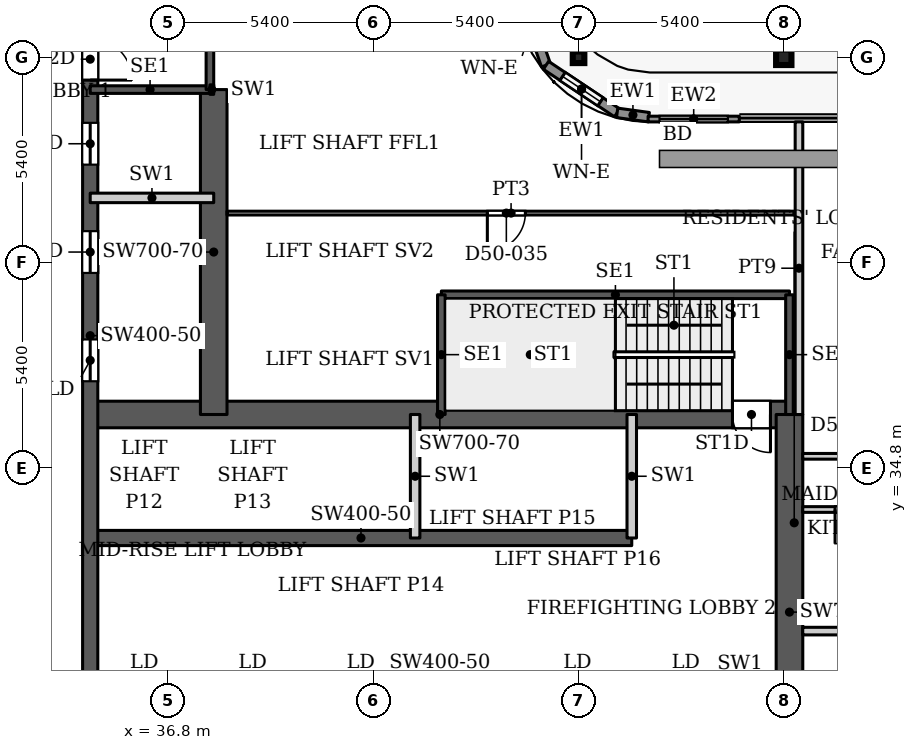
"""IFC4 building model, lengths in metres.
Left out: names, types, materials, properties, quantities, classifications, styles, units other than length and angle.
Written with IfcOpenShell. Run it as: python <this file> out.ifc"""

import sys

from ifc_helpers import new_model, si_unit, direction, frame, frame_2d, origin, origin_2d, place, context, subcontext, project, spatial, rectangle, hollow_rectangle, i_section, extrude, source, transform, mapped, element, fill, save


model = new_model("IFC4")
c1 = context("Model", 3, precision=1e-05, world=origin(), true_north=direction((0.0, 1.0)))
c2 = subcontext(c1, "Body", "Model", "MODEL_VIEW")
j1 = project(units=[si_unit("LENGTHUNIT", "METRE"), si_unit("PLANEANGLEUNIT", "RADIAN")], contexts=[c1])
p1 = place(None, origin())
s1 = spatial("IfcSite", under=j1, at=p1, CompositionType="ELEMENT")
p2 = place(p1, origin())
s2 = spatial("IfcBuilding", under=s1, at=p2, CompositionType="ELEMENT")
p3 = place(p2, frame((0.0, 0.0, 220.1)))
s3 = spatial("IfcBuildingStorey", under=s2, at=p3, CompositionType="ELEMENT", Elevation=220.1)
p4 = place(p3, frame((53.0, 45.6, 0.0), z_axis=(0.0, 0.0, 1.0), x_axis=(1.0, 0.0, 0.0)))
e1 = element("IfcColumn", 1, at=p4, inside=s3, PredefinedType="COLUMN", context=c2, shape_type="SweptSolid", body=[
    extrude(i_section(OverallWidth=0.404, OverallDepth=0.407, WebThickness=0.027, FlangeThickness=0.044, FilletRadius=0.012, at=origin_2d()), origin(), (0.0, 0.0, 1.0), 3.9),
])
p5 = place(p3, frame((47.6, 45.6, 0.0), z_axis=(0.0, 0.0, 1.0), x_axis=(1.0, 0.0, 0.0)))
e2 = element("IfcColumn", 2, at=p5, inside=s3, PredefinedType="COLUMN", context=c2, shape_type="SweptSolid", body=[
    extrude(hollow_rectangle(XDim=0.305, YDim=0.305, WallThickness=0.016, InnerFilletRadius=0.016, OuterFilletRadius=0.032, at=origin_2d()), origin(), (0.0, 0.0, 1.0), 3.9),
])
p6 = place(p3, frame((34.75, 32.95, 0.0), z_axis=(0.0, 0.0, 1.0), x_axis=(1.0, 0.0, 0.0)))
e3 = element("IfcWall", 3, at=p6, inside=s3, PredefinedType="SHEAR", context=c2, shape_type="SweptSolid", body=[
    extrude(rectangle(XDim=14.25, YDim=0.4, at=frame_2d((7.125, 0.0))), origin(), (0.0, 0.0, 1.0), 3.9),
])
p7 = place(p3, frame((34.75, 36.2, 0.0), z_axis=(0.0, 0.0, 1.0), x_axis=(1.0, 0.0, 0.0)))
e4 = element("IfcWall", 4, at=p7, inside=s3, PredefinedType="SHEAR", context=c2, shape_type="SweptSolid", body=[
    extrude(rectangle(XDim=18.4, YDim=0.7, at=frame_2d((9.2, 0.0))), origin(), (0.0, 0.0, 1.0), 3.9),
])
p8 = place(p7, frame((16.9, 0.0, 0.0)))
e5 = element("IfcOpeningElement", 5, at=p8, cuts=e4, PredefinedType="OPENING", context=c2, shape_type="SweptSolid", body=[
    extrude(rectangle(XDim=1.0, YDim=2.2, at=frame_2d((0.5, 1.1))), frame((0.0, 0.36, 0.0), z_axis=(0.0, -1.0, 0.0), x_axis=(1.0, 0.0, 0.0)), (0.0, 0.0, 1.0), 0.72),
])
p9 = place(p3, frame((34.75, 29.05, 0.0), z_axis=(0.0, 0.0, 1.0), x_axis=(0.0, 1.0, 0.0)))
e6 = element("IfcWall", 6, at=p9, inside=s3, PredefinedType="SHEAR", context=c2, shape_type="SweptSolid", body=[
    extrude(rectangle(XDim=18.45, YDim=0.4, at=frame_2d((9.225, 0.0))), origin(), (0.0, 0.0, 1.0), 3.9),
])
p10 = place(p9, frame((8.025, 0.0, 0.0)))
e7 = element("IfcOpeningElement", 7, at=p10, cuts=e6, PredefinedType="OPENING", context=c2, shape_type="SweptSolid", body=[
    extrude(rectangle(XDim=1.1, YDim=2.2, at=frame_2d((0.55, 1.1))), frame((0.0, 0.21, 0.0), z_axis=(0.0, -1.0, 0.0), x_axis=(1.0, 0.0, 0.0)), (0.0, 0.0, 1.0), 0.42),
])
p11 = place(p9, frame((10.875, 0.0, 0.0)))
e8 = element("IfcOpeningElement", 8, at=p11, cuts=e6, PredefinedType="OPENING", context=c2, shape_type="SweptSolid", body=[
    extrude(rectangle(XDim=1.1, YDim=2.2, at=frame_2d((0.55, 1.1))), frame((0.0, 0.21, 0.0), z_axis=(0.0, -1.0, 0.0), x_axis=(1.0, 0.0, 0.0)), (0.0, 0.0, 1.0), 0.42),
])
p12 = place(p9, frame((13.725, 0.0, 0.0)))
e9 = element("IfcOpeningElement", 9, at=p12, cuts=e6, PredefinedType="OPENING", context=c2, shape_type="SweptSolid", body=[
    extrude(rectangle(XDim=1.1, YDim=2.2, at=frame_2d((0.55, 1.1))), frame((0.0, 0.21, 0.0), z_axis=(0.0, -1.0, 0.0), x_axis=(1.0, 0.0, 0.0)), (0.0, 0.0, 1.0), 0.42),
])
p13 = place(p9, frame((15.95, 0.0, 0.0)))
e10 = element("IfcOpeningElement", 10, at=p13, cuts=e6, PredefinedType="OPENING", context=c2, shape_type="SweptSolid", body=[
    extrude(rectangle(XDim=1.1, YDim=2.2, at=frame_2d((0.55, 1.1))), frame((0.0, 0.21, 0.0), z_axis=(0.0, -1.0, 0.0), x_axis=(1.0, 0.0, 0.0)), (0.0, 0.0, 1.0), 0.42),
])
p14 = place(p3, frame((38.0, 36.2, 0.0), z_axis=(0.0, 0.0, 1.0), x_axis=(0.0, 1.0, 0.0)))
e11 = element("IfcWall", 11, at=p14, inside=s3, PredefinedType="SHEAR", context=c2, shape_type="SweptSolid", body=[
    extrude(rectangle(XDim=8.55, YDim=0.7, at=frame_2d((4.275, 0.0))), origin(), (0.0, 0.0, 1.0), 3.9),
])
p15 = place(p3, frame((53.15, 25.8, 0.0), z_axis=(0.0, 0.0, 1.0), x_axis=(0.0, 1.0, 0.0)))
e12 = element("IfcWall", 12, at=p15, inside=s3, PredefinedType="SHEAR", context=c2, shape_type="SweptSolid", body=[
    extrude(rectangle(XDim=10.4, YDim=0.7, at=frame_2d((5.2, 0.0))), origin(), (0.0, 0.0, 1.0), 3.9),
])
p16 = place(p3, frame((46.018, 47.471, 0.0), z_axis=(0.0, 0.0, 1.0), x_axis=(0.328791208903, -0.944402637093, 0.0)))
e13 = element("IfcWall", 13, at=p16, inside=s3, PredefinedType="SOLIDWALL", context=c2, shape_type="SweptSolid", body=[
    extrude(rectangle(XDim=2.205, YDim=0.25, at=frame_2d((1.102, 0.0))), origin(), (0.0, 0.0, 1.0), 3.75),
])
p17 = place(p16, frame((0.503, 0.0, 0.6)))
e14 = element("IfcOpeningElement", 14, at=p17, cuts=e13, PredefinedType="OPENING", context=c2, shape_type="SweptSolid", body=[
    extrude(rectangle(XDim=1.2, YDim=2.1, at=frame_2d((0.6, 1.05))), frame((0.0, 0.135, 0.0), z_axis=(0.0, -1.0, 0.0), x_axis=(1.0, 0.0, 0.0)), (0.0, 0.0, 1.0), 0.27),
])
p18 = place(p3, frame((46.743, 45.389, 0.0), z_axis=(0.0, 0.0, 1.0), x_axis=(0.831449265529, -0.555600682912, 0.0)))
e15 = element("IfcWall", 15, at=p18, inside=s3, PredefinedType="SOLIDWALL", context=c2, shape_type="SweptSolid", body=[
    extrude(rectangle(XDim=2.251, YDim=0.25, at=frame_2d((1.126, 0.0))), origin(), (0.0, 0.0, 1.0), 3.75),
])
p19 = place(p18, frame((0.525, 0.0, 0.6)))
e16 = element("IfcOpeningElement", 16, at=p19, cuts=e15, PredefinedType="OPENING", context=c2, shape_type="SweptSolid", body=[
    extrude(rectangle(XDim=1.2, YDim=2.1, at=frame_2d((0.6, 1.05))), frame((0.0, 0.135, 0.0), z_axis=(0.0, -1.0, 0.0), x_axis=(1.0, 0.0, 0.0)), (0.0, 0.0, 1.0), 0.27),
])
p20 = place(p3, frame((48.615, 44.138, 0.0), z_axis=(0.0, 0.0, 1.0), x_axis=(0.990741504246, -0.135761819977, 0.0)))
e17 = element("IfcWall", 17, at=p20, inside=s3, PredefinedType="SOLIDWALL", context=c2, shape_type="SweptSolid", body=[
    extrude(rectangle(XDim=0.84, YDim=0.25, at=frame_2d((0.42, 0.0))), origin(), (0.0, 0.0, 1.0), 3.75),
])
p21 = place(p3, frame((49.43, 43.975, 0.0), z_axis=(0.0, 0.0, 1.0), x_axis=(1.0, 0.0, 0.0)))
e18 = element("IfcWall", 18, at=p21, inside=s3, PredefinedType="SOLIDWALL", context=c2, shape_type="SweptSolid", body=[
    extrude(rectangle(XDim=2.4, YDim=0.15, at=frame_2d((1.2, 0.0))), origin(), (0.0, 0.0, 1.0), 3.75),
])
p22 = place(p21, frame((0.3, 0.0, 0.0)))
e19 = element("IfcOpeningElement", 19, at=p22, cuts=e18, PredefinedType="OPENING", context=c2, shape_type="SweptSolid", body=[
    extrude(rectangle(XDim=1.8, YDim=2.4, at=frame_2d((0.9, 1.2))), frame((0.0, 0.085, 0.0), z_axis=(0.0, -1.0, 0.0), x_axis=(1.0, 0.0, 0.0)), (0.0, 0.0, 1.0), 0.17),
])
p23 = place(p3, frame((43.99, 39.35, 0.0), z_axis=(0.0, 0.0, 1.0), x_axis=(1.0, 0.0, 0.0)))
e20 = element("IfcWall", 20, at=p23, inside=s3, PredefinedType="SHEAR", context=c2, shape_type="SweptSolid", body=[
    extrude(rectangle(XDim=9.16, YDim=0.2, at=frame_2d((4.58, 0.0))), origin(), (0.0, 0.0, 1.0), 3.9),
])
for number, where, z_axis, x_axis in (
    (21, (43.99, 36.2, 0.0), (0.0, 0.0, 1.0), (0.0, 1.0, 0.0)),
    (22, (53.15, 36.2, 0.0), (0.0, 0.0, 1.0), (0.0, 1.0, 0.0)),
):
    element("IfcWall", number, at=place(p3, frame(where, z_axis=z_axis, x_axis=x_axis)), inside=s3, PredefinedType="SHEAR", context=c2, shape_type="SweptSolid", body=[
        extrude(rectangle(XDim=3.15, YDim=0.2, at=frame_2d((1.575, 0.0))), origin(), (0.0, 0.0, 1.0), 3.9),
    ])
p24 = place(p3, frame((34.75, 44.75, 0.0), z_axis=(0.0, 0.0, 1.0), x_axis=(1.0, 0.0, 0.0)))
e23 = element("IfcWall", 23, at=p24, inside=s3, PredefinedType="SHEAR", context=c2, shape_type="SweptSolid", body=[
    extrude(rectangle(XDim=3.15, YDim=0.2, at=frame_2d((1.575, 0.0))), origin(), (0.0, 0.0, 1.0), 3.9),
])
p25 = place(p3, frame((37.9, 44.75, 0.0), z_axis=(0.0, 0.0, 1.0), x_axis=(0.0, 1.0, 0.0)))
e24 = element("IfcWall", 24, at=p25, inside=s3, PredefinedType="SHEAR", context=c2, shape_type="SweptSolid", body=[
    extrude(rectangle(XDim=9.16, YDim=0.2, at=frame_2d((4.58, 0.0))), origin(), (0.0, 0.0, 1.0), 3.9),
])
for number, where, z_axis, x_axis in (
    (25, (43.3, 32.95, 0.0), (0.0, 0.0, 1.0), (0.0, 1.0, 0.0)),
    (26, (49.0, 32.95, 0.0), (0.0, 0.0, 1.0), (0.0, 1.0, 0.0)),
    (27, (34.75, 41.9, 0.0), (0.0, 0.0, 1.0), (1.0, 0.0, 0.0)),
):
    element("IfcWall", number, at=place(p3, frame(where, z_axis=z_axis, x_axis=x_axis)), inside=s3, PredefinedType="PARTITIONING", context=c2, shape_type="SweptSolid", body=[
        extrude(rectangle(XDim=3.25, YDim=0.25, at=frame_2d((1.625, 0.0))), origin(), (0.0, 0.0, 1.0), 3.9),
    ])
p26 = place(p3, frame((37.9, 44.75, 0.0), z_axis=(0.0, 0.0, 1.0), x_axis=(1.0, 0.0, 0.0)))
e28 = element("IfcWall", 28, at=p26, inside=s3, PredefinedType="PARTITIONING", context=c2, shape_type="SweptSolid", body=[
    extrude(rectangle(XDim=0.1, YDim=0.25, at=frame_2d((0.05, 0.0))), origin(), (0.0, 0.0, 1.0), 3.9),
])
p27 = place(p3, frame((38.349, 41.5, 0.0), z_axis=(0.0, 0.0, 1.0), x_axis=(1.0, 0.0, 0.0)))
e29 = element("IfcWall", 29, at=p27, inside=s3, PredefinedType="PARTITIONING", context=c2, shape_type="SweptSolid", body=[
    extrude(rectangle(XDim=14.951, YDim=0.1, at=frame_2d((7.476, 0.0))), origin(), (0.0, 0.0, 1.0), 3.6),
])
p28 = place(p27, frame((6.851, 0.0, 0.0)))
e30 = element("IfcOpeningElement", 30, at=p28, cuts=e29, PredefinedType="OPENING", context=c2, shape_type="SweptSolid", body=[
    extrude(rectangle(XDim=1.0, YDim=2.1, at=frame_2d((0.5, 1.05))), frame((0.0, 0.06, 0.0), z_axis=(0.0, -1.0, 0.0), x_axis=(1.0, 0.0, 0.0)), (0.0, 0.0, 1.0), 0.12),
])
p29 = place(p3, frame((53.4, 36.199, 0.0), z_axis=(0.0, 0.0, 1.0), x_axis=(0.0, 1.0, 0.0)))
e31 = element("IfcWall", 31, at=p29, inside=s3, PredefinedType="PARTITIONING", context=c2, shape_type="SweptSolid", body=[
    extrude(rectangle(XDim=7.701, YDim=0.2, at=frame_2d((3.851, 0.0))), origin(), (0.0, 0.0, 1.0), 3.6),
])
p30 = place(p3, frame((53.499, 30.5, 0.0), z_axis=(0.0, 0.0, 1.0), x_axis=(1.0, 0.0, 0.0)))
e32 = element("IfcWall", 32, at=p30, inside=s3, PredefinedType="PARTITIONING", context=c2, shape_type="SweptSolid", body=[
    extrude(rectangle(XDim=28.401, YDim=0.2, at=frame_2d((14.2, 0.0))), origin(), (0.0, 0.0, 1.0), 3.6),
])
p31 = place(p30, frame((10.201, 0.0, 0.0)))
e33 = element("IfcOpeningElement", 33, at=p31, cuts=e32, PredefinedType="OPENING", context=c2, shape_type="SweptSolid", body=[
    extrude(rectangle(XDim=1.0, YDim=2.1, at=frame_2d((0.5, 1.05))), frame((0.0, 0.11, 0.0), z_axis=(0.0, -1.0, 0.0), x_axis=(1.0, 0.0, 0.0)), (0.0, 0.0, 1.0), 0.22),
])
p32 = place(p30, frame((12.151, 0.0, 0.0)))
e34 = element("IfcOpeningElement", 34, at=p32, cuts=e32, PredefinedType="OPENING", context=c2, shape_type="SweptSolid", body=[
    extrude(rectangle(XDim=1.0, YDim=2.1, at=frame_2d((0.5, 1.05))), frame((0.0, 0.11, 0.0), z_axis=(0.0, -1.0, 0.0), x_axis=(1.0, 0.0, 0.0)), (0.0, 0.0, 1.0), 0.22),
])
p33 = place(p30, frame((24.001, 0.0, 0.0)))
e35 = element("IfcOpeningElement", 35, at=p33, cuts=e32, PredefinedType="OPENING", context=c2, shape_type="SweptSolid", body=[
    extrude(rectangle(XDim=1.0, YDim=2.1, at=frame_2d((0.5, 1.05))), frame((0.0, 0.11, 0.0), z_axis=(0.0, -1.0, 0.0), x_axis=(1.0, 0.0, 0.0)), (0.0, 0.0, 1.0), 0.22),
])
p34 = place(p3, frame((53.499, 33.7, 0.0), z_axis=(0.0, 0.0, 1.0), x_axis=(1.0, 0.0, 0.0)))
e36 = element("IfcWall", 36, at=p34, inside=s3, PredefinedType="PARTITIONING", context=c2, shape_type="SweptSolid", body=[
    extrude(rectangle(XDim=9.876, YDim=0.15, at=frame_2d((4.938, 0.0))), origin(), (0.0, 0.0, 1.0), 3.6),
])
p35 = place(p34, frame((6.851, 0.0, 0.0)))
e37 = element("IfcOpeningElement", 37, at=p35, cuts=e36, PredefinedType="OPENING", context=c2, shape_type="SweptSolid", body=[
    extrude(rectangle(XDim=0.8, YDim=2.1, at=frame_2d((0.4, 1.05))), frame((0.0, 0.085, 0.0), z_axis=(0.0, -1.0, 0.0), x_axis=(1.0, 0.0, 0.0)), (0.0, 0.0, 1.0), 0.17),
])
p36 = place(p34, frame((0.851, 0.0, 0.0)))
e38 = element("IfcOpeningElement", 38, at=p36, cuts=e36, PredefinedType="OPENING", context=c2, shape_type="SweptSolid", body=[
    extrude(rectangle(XDim=0.9, YDim=2.1, at=frame_2d((0.45, 1.05))), frame((0.0, 0.085, 0.0), z_axis=(0.0, -1.0, 0.0), x_axis=(1.0, 0.0, 0.0)), (0.0, 0.0, 1.0), 0.17),
])
p37 = place(p34, frame((4.901, 0.0, 0.0)))
e39 = element("IfcOpeningElement", 39, at=p37, cuts=e36, PredefinedType="OPENING", context=c2, shape_type="SweptSolid", body=[
    extrude(rectangle(XDim=0.8, YDim=2.1, at=frame_2d((0.4, 1.05))), frame((0.0, 0.085, 0.0), z_axis=(0.0, -1.0, 0.0), x_axis=(1.0, 0.0, 0.0)), (0.0, 0.0, 1.0), 0.17),
])
p38 = place(p34, frame((8.651, 0.0, 0.0)))
e40 = element("IfcOpeningElement", 40, at=p38, cuts=e36, PredefinedType="OPENING", context=c2, shape_type="SweptSolid", body=[
    extrude(rectangle(XDim=0.8, YDim=2.1, at=frame_2d((0.4, 1.05))), frame((0.0, 0.085, 0.0), z_axis=(0.0, -1.0, 0.0), x_axis=(1.0, 0.0, 0.0)), (0.0, 0.0, 1.0), 0.17),
])
p39 = place(p3, frame((53.499, 35.1, 0.0), z_axis=(0.0, 0.0, 1.0), x_axis=(1.0, 0.0, 0.0)))
e41 = element("IfcWall", 41, at=p39, inside=s3, PredefinedType="PARTITIONING", context=c2, shape_type="SweptSolid", body=[
    extrude(rectangle(XDim=11.501, YDim=0.15, at=frame_2d((5.75, 0.0))), origin(), (0.0, 0.0, 1.0), 3.6),
])
p40 = place(p39, frame((5.001, 0.0, 0.0)))
e42 = element("IfcOpeningElement", 42, at=p40, cuts=e41, PredefinedType="OPENING", context=c2, shape_type="SweptSolid", body=[
    extrude(rectangle(XDim=0.9, YDim=2.1, at=frame_2d((0.45, 1.05))), frame((0.0, 0.085, 0.0), z_axis=(0.0, -1.0, 0.0), x_axis=(1.0, 0.0, 0.0)), (0.0, 0.0, 1.0), 0.17),
])
p41 = place(p39, frame((1.701, 0.0, 0.0)))
e43 = element("IfcOpeningElement", 43, at=p41, cuts=e41, PredefinedType="OPENING", context=c2, shape_type="SweptSolid", body=[
    extrude(rectangle(XDim=1.0, YDim=2.1, at=frame_2d((0.5, 1.05))), frame((0.0, 0.085, 0.0), z_axis=(0.0, -1.0, 0.0), x_axis=(1.0, 0.0, 0.0)), (0.0, 0.0, 1.0), 0.17),
])
p42 = place(p39, frame((7.701, 0.0, 0.0)))
e44 = element("IfcOpeningElement", 44, at=p42, cuts=e41, PredefinedType="OPENING", context=c2, shape_type="SweptSolid", body=[
    extrude(rectangle(XDim=0.9, YDim=2.1, at=frame_2d((0.45, 1.05))), frame((0.0, 0.085, 0.0), z_axis=(0.0, -1.0, 0.0), x_axis=(1.0, 0.0, 0.0)), (0.0, 0.0, 1.0), 0.17),
])
m1 = source(origin(), c2, "Body", "SweptSolid", [
    extrude(rectangle(XDim=1.2, YDim=2.1, at=frame_2d((0.6, 1.05))), frame((0.0, 0.03, 0.0), z_axis=(0.0, -1.0, 0.0), x_axis=(1.0, 0.0, 0.0)), (0.0, 0.0, 1.0), 0.06),
])
p43 = place(p19, origin())
e45 = element("IfcWindow", 45, at=p43, inside=s3, PartitioningType="SINGLE_PANEL", PredefinedType="WINDOW", context=c2, shape_type="MappedRepresentation", body=[
    mapped(m1, transform((0.0, 0.0, 0.0), x_axis=(1.0, 0.0, 0.0), y_axis=(0.0, 1.0, 0.0), z_axis=(0.0, 0.0, 1.0), scale=1.0)),
])
fill(e16, e45)
m2 = source(origin(), c2, "Body", "SweptSolid", [
    extrude(rectangle(XDim=1.8, YDim=2.4, at=frame_2d((0.9, 1.2))), frame((0.0, 0.025, 0.0), z_axis=(0.0, -1.0, 0.0), x_axis=(1.0, 0.0, 0.0)), (0.0, 0.0, 1.0), 0.05),
])
p44 = place(p22, origin())
e46 = element("IfcDoor", 46, at=p44, inside=s3, OperationType="SLIDING_TO_LEFT", PredefinedType="DOOR", context=c2, shape_type="MappedRepresentation", body=[
    mapped(m2, transform((0.0, 0.0, 0.0), x_axis=(1.0, 0.0, 0.0), y_axis=(0.0, 1.0, 0.0), z_axis=(0.0, 0.0, 1.0), scale=1.0)),
])
fill(e19, e46)
m3 = source(origin(), c2, "Body", "SweptSolid", [
    extrude(rectangle(XDim=1.1, YDim=2.2, at=frame_2d((0.55, 1.1))), frame((0.0, 0.025, 0.0), z_axis=(0.0, -1.0, 0.0), x_axis=(1.0, 0.0, 0.0)), (0.0, 0.0, 1.0), 0.05),
])
p45 = place(p10, origin())
e47 = element("IfcDoor", 47, at=p45, inside=s3, OperationType="SLIDING_TO_LEFT", PredefinedType="DOOR", context=c2, shape_type="MappedRepresentation", body=[
    mapped(m3, transform((0.0, 0.0, 0.0), x_axis=(1.0, 0.0, 0.0), y_axis=(0.0, 1.0, 0.0), z_axis=(0.0, 0.0, 1.0), scale=1.0)),
])
fill(e7, e47)
p46 = place(p11, origin())
e48 = element("IfcDoor", 48, at=p46, inside=s3, OperationType="SLIDING_TO_LEFT", PredefinedType="DOOR", context=c2, shape_type="MappedRepresentation", body=[
    mapped(m3, transform((0.0, 0.0, 0.0), x_axis=(1.0, 0.0, 0.0), y_axis=(0.0, 1.0, 0.0), z_axis=(0.0, 0.0, 1.0), scale=1.0)),
])
fill(e8, e48)
p47 = place(p12, origin())
e49 = element("IfcDoor", 49, at=p47, inside=s3, OperationType="SLIDING_TO_LEFT", PredefinedType="DOOR", context=c2, shape_type="MappedRepresentation", body=[
    mapped(m3, transform((0.0, 0.0, 0.0), x_axis=(1.0, 0.0, 0.0), y_axis=(0.0, 1.0, 0.0), z_axis=(0.0, 0.0, 1.0), scale=1.0)),
])
fill(e9, e49)
m4 = source(origin(), c2, "Body", "SweptSolid", [
    extrude(rectangle(XDim=1.0, YDim=2.2, at=frame_2d((0.5, 1.1))), frame((0.0, 0.025, 0.0), z_axis=(0.0, -1.0, 0.0), x_axis=(1.0, 0.0, 0.0)), (0.0, 0.0, 1.0), 0.05),
])
p48 = place(p8, origin())
e50 = element("IfcDoor", 50, at=p48, inside=s3, OperationType="SINGLE_SWING_RIGHT", PredefinedType="DOOR", context=c2, shape_type="MappedRepresentation", body=[
    mapped(m4, transform((0.0, 0.0, 0.0), x_axis=(1.0, 0.0, 0.0), y_axis=(0.0, 1.0, 0.0), z_axis=(0.0, 0.0, 1.0), scale=1.0)),
])
fill(e5, e50)
m5 = source(origin(), c2, "Body", "SweptSolid", [
    extrude(rectangle(XDim=1.1, YDim=2.2, at=frame_2d((0.55, 1.1))), frame((0.0, 0.025, 0.0), z_axis=(0.0, -1.0, 0.0), x_axis=(1.0, 0.0, 0.0)), (0.0, 0.0, 1.0), 0.05),
])
p49 = place(p13, origin())
e51 = element("IfcDoor", 51, at=p49, inside=s3, OperationType="SINGLE_SWING_RIGHT", PredefinedType="DOOR", context=c2, shape_type="MappedRepresentation", body=[
    mapped(m5, transform((0.0, 0.0, 0.0), x_axis=(1.0, 0.0, 0.0), y_axis=(0.0, 1.0, 0.0), z_axis=(0.0, 0.0, 1.0), scale=1.0)),
])
fill(e10, e51)
m6 = source(origin(), c2, "Body", "SweptSolid", [
    extrude(rectangle(XDim=0.9, YDim=2.1, at=frame_2d((0.45, 1.05))), frame((0.0, 0.025, 0.0), z_axis=(0.0, -1.0, 0.0), x_axis=(1.0, 0.0, 0.0)), (0.0, 0.0, 1.0), 0.05),
])
p50 = place(p36, origin())
e52 = element("IfcDoor", 52, at=p50, inside=s3, OperationType="SINGLE_SWING_RIGHT", PredefinedType="DOOR", context=c2, shape_type="MappedRepresentation", body=[
    mapped(m6, transform((0.0, 0.0, 0.0), x_axis=(1.0, 0.0, 0.0), y_axis=(0.0, 1.0, 0.0), z_axis=(0.0, 0.0, 1.0), scale=1.0)),
])
fill(e38, e52)
m7 = source(origin(), c2, "Body", "SweptSolid", [
    extrude(rectangle(XDim=1.0, YDim=2.1, at=frame_2d((0.5, 1.05))), frame((0.0, 0.025, 0.0), z_axis=(0.0, -1.0, 0.0), x_axis=(1.0, 0.0, 0.0)), (0.0, 0.0, 1.0), 0.05),
])
p51 = place(p28, origin())
e53 = element("IfcDoor", 53, at=p51, inside=s3, OperationType="SINGLE_SWING_RIGHT", PredefinedType="DOOR", context=c2, shape_type="MappedRepresentation", body=[
    mapped(m7, transform((0.0, 0.0, 0.0), x_axis=(1.0, 0.0, 0.0), y_axis=(0.0, 1.0, 0.0), z_axis=(0.0, 0.0, 1.0), scale=1.0)),
])
fill(e30, e53)
save(model, sys.argv[1])
